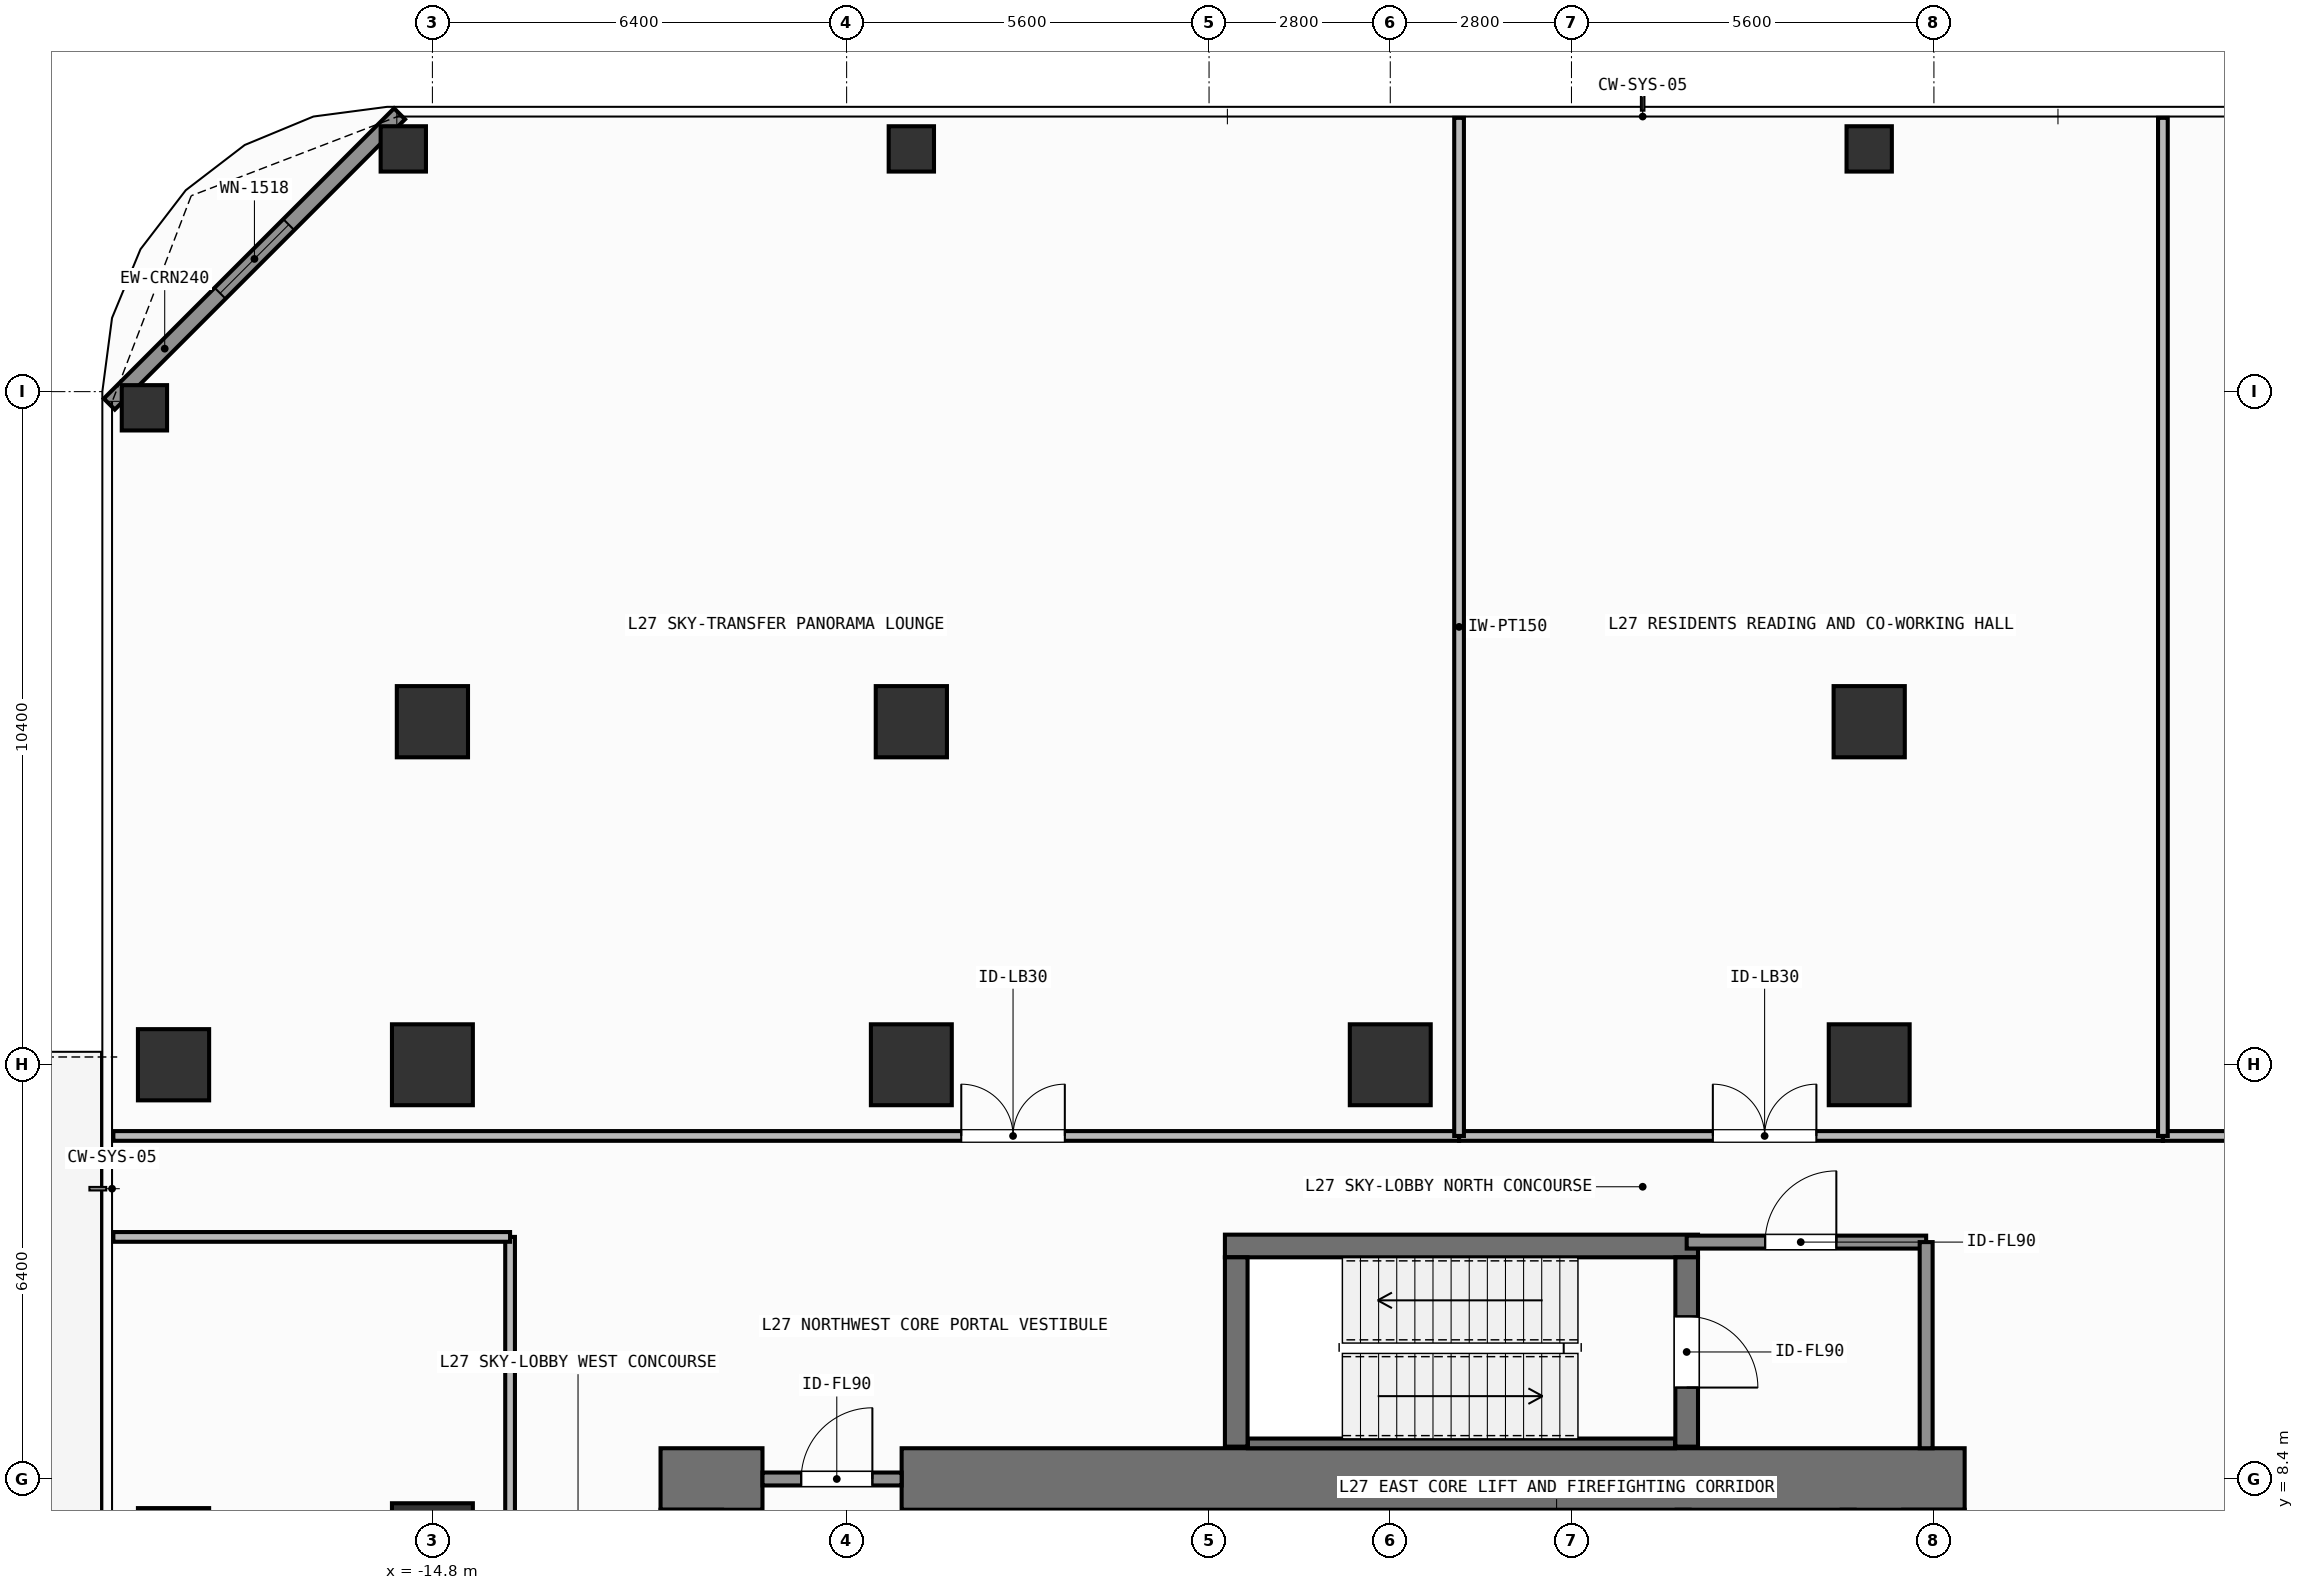
"""IFC4 building model, lengths in metres.
Left out: names, types, materials, properties, quantities, classifications, styles, units other than length and angle.
Written with IfcOpenShell. Run it as: python <this file> out.ifc"""

import sys

from ifc_helpers import new_model, si_unit, direction, frame, frame_2d, origin, origin_2d, place, context, subcontext, project, spatial, rectangle, hollow_rectangle, extrude, element, fill, save


model = new_model("IFC4")
c1 = context("Model", 3, precision=1e-05, world=origin(), true_north=direction((0.0, 1.0)))
c2 = subcontext(c1, "Body", "Model", "MODEL_VIEW")
j1 = project(units=[si_unit("LENGTHUNIT", "METRE"), si_unit("PLANEANGLEUNIT", "RADIAN")], contexts=[c1])
p1 = place(None, origin())
s1 = spatial("IfcSite", under=j1, at=p1, CompositionType="ELEMENT")
p2 = place(p1, origin())
s2 = spatial("IfcBuilding", under=s1, at=p2, CompositionType="ELEMENT")
p3 = place(p2, frame((0.0, 0.0, 108.6)))
s3 = spatial("IfcBuildingStorey", under=s2, at=p3, CompositionType="ELEMENT", Elevation=108.6)
p4 = place(p3, frame((-11.275, 8.4, 0.0), z_axis=(0.0, 0.0, 1.0), x_axis=(1.0, 0.0, 0.0)))
e1 = element("IfcWall", 1, at=p4, inside=s3, PredefinedType="SHEAR", context=c2, shape_type="SweptSolid", body=[
    extrude(rectangle(XDim=1.575, YDim=0.95, at=frame_2d((0.788, 0.0))), origin(), (0.0, 0.0, 1.0), 4.8),
])
p5 = place(p3, frame((-7.55, 8.4, 0.0), z_axis=(0.0, 0.0, 1.0), x_axis=(1.0, 0.0, 0.0)))
e2 = element("IfcWall", 2, at=p5, inside=s3, PredefinedType="SHEAR", context=c2, shape_type="SweptSolid", body=[
    extrude(rectangle(XDim=16.425, YDim=0.95, at=frame_2d((8.212, 0.0))), origin(), (0.0, 0.0, 1.0), 4.8),
])
p6 = place(p3, frame((-10.8, -7.925, 0.0), z_axis=(0.0, 0.0, 1.0), x_axis=(0.0, 1.0, 0.0)))
e3 = element("IfcWall", 3, at=p6, inside=s3, PredefinedType="SHEAR", context=c2, shape_type="SweptSolid", body=[
    extrude(rectangle(XDim=15.85, YDim=0.95, at=frame_2d((7.925, 0.0))), origin(), (0.0, 0.0, 1.0), 4.8),
])
p7 = place(p3, frame((8.4, 5.825, 0.0), z_axis=(0.0, 0.0, 1.0), x_axis=(0.0, 1.0, 0.0)))
e4 = element("IfcWall", 4, at=p7, inside=s3, PredefinedType="SHEAR", context=c2, shape_type="SweptSolid", body=[
    extrude(rectangle(XDim=2.1, YDim=0.95, at=frame_2d((1.05, 0.0))), origin(), (0.0, 0.0, 1.0), 4.8),
])
p8 = place(p3, frame((-2.555, 12.0, 0.0), z_axis=(0.0, 0.0, 1.0), x_axis=(1.0, 0.0, 0.0)))
e5 = element("IfcWall", 5, at=p8, inside=s3, PredefinedType="SHEAR", context=c2, shape_type="SweptSolid", body=[
    extrude(rectangle(XDim=7.31, YDim=0.35, at=frame_2d((3.655, 0.0))), origin(), (0.0, 0.0, 1.0), 4.8),
])
p9 = place(p3, frame((-2.2, 8.95, 0.0), z_axis=(0.0, 0.0, 1.0), x_axis=(1.0, 0.0, 0.0)))
e6 = element("IfcWall", 6, at=p9, inside=s3, PredefinedType="SHEAR", context=c2, shape_type="SweptSolid", body=[
    extrude(rectangle(XDim=6.6, YDim=0.15, at=frame_2d((3.3, 0.0))), origin(), (0.0, 0.0, 1.0), 4.8),
])
p10 = place(p3, frame((-2.38, 8.9, 0.0), z_axis=(0.0, 0.0, 1.0), x_axis=(0.0, 1.0, 0.0)))
e7 = element("IfcWall", 7, at=p10, inside=s3, PredefinedType="SHEAR", context=c2, shape_type="SweptSolid", body=[
    extrude(rectangle(XDim=2.925, YDim=0.35, at=frame_2d((1.462, 0.0))), origin(), (0.0, 0.0, 1.0), 4.8),
])
p11 = place(p3, frame((4.58, 11.825, 0.0), z_axis=(0.0, 0.0, 1.0), x_axis=(0.0, -1.0, 0.0)))
e8 = element("IfcWall", 8, at=p11, inside=s3, PredefinedType="SHEAR", context=c2, shape_type="SweptSolid", body=[
    extrude(rectangle(XDim=2.925, YDim=0.35, at=frame_2d((1.462, 0.0))), origin(), (0.0, 0.0, 1.0), 4.8),
])
p12 = place(p11, frame((0.913, 0.0, 0.0)))
e9 = element("IfcOpeningElement", 9, at=p12, cuts=e8, PredefinedType="OPENING", context=c2, shape_type="SweptSolid", body=[
    extrude(rectangle(XDim=1.1, YDim=2.15, at=frame_2d((0.55, 1.075))), frame((0.0, 0.185, 0.0), z_axis=(0.0, -1.0, 0.0), x_axis=(1.0, 0.0, 0.0)), (0.0, 0.0, 1.0), 0.37),
])
for number, where, z_axis, x_axis in (
    (10, (-14.8, 14.8, 0.0), (0.0, 0.0, 1.0), (1.0, 0.0, 0.0)),
    (11, (-7.4, 14.8, 0.0), (0.0, 0.0, 1.0), (1.0, 0.0, 0.0)),
    (12, (0.0, 14.8, 0.0), (0.0, 0.0, 1.0), (1.0, 0.0, 0.0)),
    (13, (7.4, 14.8, 0.0), (0.0, 0.0, 1.0), (1.0, 0.0, 0.0)),
    (14, (-14.8, 7.4, 0.0), (0.0, 0.0, 1.0), (1.0, 0.0, 0.0)),
):
    element("IfcColumn", number, at=place(p3, frame(where, z_axis=z_axis, x_axis=x_axis)), inside=s3, PredefinedType="COLUMN", context=c2, shape_type="SweptSolid", body=[
        extrude(rectangle(XDim=1.25, YDim=1.25, at=origin_2d()), origin(), (0.0, 0.0, 1.0), 4.8),
    ])
for number, where, z_axis, x_axis in (
    (15, (-18.8, 7.4, 0.0), (0.0, 0.0, 1.0), (1.0, 0.0, 0.0)),
    (16, (-18.8, 14.8, 0.0), (0.0, 0.0, 1.0), (1.0, 0.0, 0.0)),
    (17, (-14.8, 20.1, 0.0), (0.0, 0.0, 1.0), (1.0, 0.0, 0.0)),
    (18, (-7.4, 20.1, 0.0), (0.0, 0.0, 1.0), (1.0, 0.0, 0.0)),
    (19, (7.4, 20.1, 0.0), (0.0, 0.0, 1.0), (1.0, 0.0, 0.0)),
):
    element("IfcColumn", number, at=place(p3, frame(where, z_axis=z_axis, x_axis=x_axis)), inside=s3, PredefinedType="COLUMN", context=c2, shape_type="SweptSolid", body=[
        extrude(rectangle(XDim=1.1, YDim=1.1, at=origin_2d()), origin(), (0.0, 0.0, 1.0), 4.8),
    ])
for number, where, z_axis, x_axis in (
    (20, (-15.25, 28.95, 0.0), (0.0, 0.0, 1.0), (1.0, 0.0, 0.0)),
    (21, (-19.25, 24.95, 0.0), (0.0, 0.0, 1.0), (1.0, 0.0, 0.0)),
    (22, (-7.4, 28.95, 0.0), (0.0, 0.0, 1.0), (1.0, 0.0, 0.0)),
    (23, (7.4, 28.95, 0.0), (0.0, 0.0, 1.0), (1.0, 0.0, 0.0)),
):
    element("IfcColumn", number, at=place(p3, frame(where, z_axis=z_axis, x_axis=x_axis)), inside=s3, PredefinedType="COLUMN", context=c2, shape_type="SweptSolid", body=[
        extrude(hollow_rectangle(XDim=0.7, YDim=0.7, WallThickness=0.032, at=origin_2d()), origin(), (0.0, 0.0, 1.0), 4.8),
    ])
p13 = place(p3, frame((-19.792, 25.008, 0.0), z_axis=(0.0, 0.0, 1.0), x_axis=(0.707106781187, 0.707106781187, 0.0)))
e24 = element("IfcWall", 24, at=p13, inside=s3, PredefinedType="SOLIDWALL", context=c2, shape_type="SweptSolid", body=[
    extrude(rectangle(XDim=6.343, YDim=0.24, at=frame_2d((3.171, 0.0))), origin(), (0.0, 0.0, 1.0), 4.58),
])
p14 = place(p13, frame((2.421, 0.0, 0.8)))
e25 = element("IfcOpeningElement", 25, at=p14, cuts=e24, PredefinedType="OPENING", context=c2, shape_type="SweptSolid", body=[
    extrude(rectangle(XDim=1.5, YDim=1.85, at=frame_2d((0.75, 0.925))), frame((0.0, 0.13, 0.0), z_axis=(0.0, -1.0, 0.0), x_axis=(1.0, 0.0, 0.0)), (0.0, 0.0, 1.0), 0.26),
])
p15 = place(p3, frame((4.525, 5.825, 0.0), z_axis=(0.0, 0.0, 1.0), x_axis=(0.0, 1.0, 0.0)))
e26 = element("IfcWall", 26, at=p15, inside=s3, PredefinedType="SHEAR", context=c2, shape_type="SweptSolid", body=[
    extrude(rectangle(XDim=2.1, YDim=0.2, at=frame_2d((1.05, 0.0))), origin(), (0.0, 0.0, 1.0), 4.58),
])
p16 = place(p15, frame((0.425, 0.0, 0.0)))
e27 = element("IfcOpeningElement", 27, at=p16, cuts=e26, PredefinedType="OPENING", context=c2, shape_type="SweptSolid", body=[
    extrude(rectangle(XDim=1.1, YDim=2.2, at=frame_2d((0.55, 1.1))), frame((0.0, 0.11, 0.0), z_axis=(0.0, -1.0, 0.0), x_axis=(1.0, 0.0, 0.0)), (0.0, 0.0, 1.0), 0.22),
])
p17 = place(p3, frame((7.075, 5.825, 0.0), z_axis=(0.0, 0.0, 1.0), x_axis=(0.0, 1.0, 0.0)))
e28 = element("IfcWall", 28, at=p17, inside=s3, PredefinedType="SHEAR", context=c2, shape_type="SweptSolid", body=[
    extrude(rectangle(XDim=2.1, YDim=0.2, at=frame_2d((1.05, 0.0))), origin(), (0.0, 0.0, 1.0), 4.58),
])
p18 = place(p3, frame((4.58, 12.06, 0.0), z_axis=(0.0, 0.0, 1.0), x_axis=(1.0, 0.0, 0.0)))
e29 = element("IfcWall", 29, at=p18, inside=s3, PredefinedType="SOLIDWALL", context=c2, shape_type="SweptSolid", body=[
    extrude(rectangle(XDim=3.7, YDim=0.2, at=frame_2d((1.85, 0.0))), origin(), (0.0, 0.0, 1.0), 4.58),
])
p19 = place(p18, frame((1.212, 0.0, 0.0)))
e30 = element("IfcOpeningElement", 30, at=p19, cuts=e29, PredefinedType="OPENING", context=c2, shape_type="SweptSolid", body=[
    extrude(rectangle(XDim=1.1, YDim=2.15, at=frame_2d((0.55, 1.075))), frame((0.0, 0.11, 0.0), z_axis=(0.0, -1.0, 0.0), x_axis=(1.0, 0.0, 0.0)), (0.0, 0.0, 1.0), 0.22),
])
p20 = place(p3, frame((-9.7, 8.4, 0.0), z_axis=(0.0, 0.0, 1.0), x_axis=(1.0, 0.0, 0.0)))
e31 = element("IfcWall", 31, at=p20, inside=s3, PredefinedType="SOLIDWALL", context=c2, shape_type="SweptSolid", body=[
    extrude(rectangle(XDim=2.15, YDim=0.2, at=frame_2d((1.075, 0.0))), origin(), (0.0, 0.0, 1.0), 3.62),
])
p21 = place(p20, frame((0.598, 0.0, 0.0)))
e32 = element("IfcOpeningElement", 32, at=p21, cuts=e31, PredefinedType="OPENING", context=c2, shape_type="SweptSolid", body=[
    extrude(rectangle(XDim=1.1, YDim=2.15, at=frame_2d((0.55, 1.075))), frame((0.0, 0.11, 0.0), z_axis=(0.0, -1.0, 0.0), x_axis=(1.0, 0.0, 0.0)), (0.0, 0.0, 1.0), 0.22),
])
p22 = place(p3, frame((-19.73, 13.7, 0.0), z_axis=(0.0, 0.0, 1.0), x_axis=(1.0, 0.0, 0.0)))
e33 = element("IfcWall", 33, at=p22, inside=s3, PredefinedType="PARTITIONING", context=c2, shape_type="SweptSolid", body=[
    extrude(rectangle(XDim=20.793, YDim=0.15, at=frame_2d((10.396, 0.0))), origin(), (0.0, 0.0, 1.0), 4.58),
])
p23 = place(p22, frame((13.102, 0.0, 0.0)))
e34 = element("IfcOpeningElement", 34, at=p23, cuts=e33, PredefinedType="OPENING", context=c2, shape_type="SweptSolid", body=[
    extrude(rectangle(XDim=1.6, YDim=2.3, at=frame_2d((0.8, 1.15))), frame((0.0, 0.085, 0.0), z_axis=(0.0, -1.0, 0.0), x_axis=(1.0, 0.0, 0.0)), (0.0, 0.0, 1.0), 0.17),
])
p24 = place(p3, frame((1.063, 13.7, 0.0), z_axis=(0.0, 0.0, 1.0), x_axis=(1.0, 0.0, 0.0)))
e35 = element("IfcWall", 35, at=p24, inside=s3, PredefinedType="PARTITIONING", context=c2, shape_type="SweptSolid", body=[
    extrude(rectangle(XDim=10.875, YDim=0.15, at=frame_2d((5.438, 0.0))), origin(), (0.0, 0.0, 1.0), 4.58),
])
p25 = place(p24, frame((3.921, 0.0, 0.0)))
e36 = element("IfcOpeningElement", 36, at=p25, cuts=e35, PredefinedType="OPENING", context=c2, shape_type="SweptSolid", body=[
    extrude(rectangle(XDim=1.6, YDim=2.3, at=frame_2d((0.8, 1.15))), frame((0.0, 0.085, 0.0), z_axis=(0.0, -1.0, 0.0), x_axis=(1.0, 0.0, 0.0)), (0.0, 0.0, 1.0), 0.17),
])
p26 = place(p3, frame((11.938, 13.7, 0.0), z_axis=(0.0, 0.0, 1.0), x_axis=(1.0, 0.0, 0.0)))
e37 = element("IfcWall", 37, at=p26, inside=s3, PredefinedType="PARTITIONING", context=c2, shape_type="SweptSolid", body=[
    extrude(rectangle(XDim=15.592, YDim=0.15, at=frame_2d((7.796, 0.0))), origin(), (0.0, 0.0, 1.0), 4.58),
])
p27 = place(p26, frame((5.19, 0.0, 0.0)))
e38 = element("IfcOpeningElement", 38, at=p27, cuts=e37, PredefinedType="OPENING", context=c2, shape_type="SweptSolid", body=[
    extrude(rectangle(XDim=0.9, YDim=2.1, at=frame_2d((0.45, 1.05))), frame((0.0, 0.085, 0.0), z_axis=(0.0, -1.0, 0.0), x_axis=(1.0, 0.0, 0.0)), (0.0, 0.0, 1.0), 0.17),
])
p28 = place(p3, frame((-13.6, -12.14, 0.0), z_axis=(0.0, 0.0, 1.0), x_axis=(0.0, 1.0, 0.0)))
e39 = element("IfcWall", 39, at=p28, inside=s3, PredefinedType="PARTITIONING", context=c2, shape_type="SweptSolid", body=[
    extrude(rectangle(XDim=24.28, YDim=0.15, at=frame_2d((12.14, 0.0))), origin(), (0.0, 0.0, 1.0), 4.58),
])
p29 = place(p28, frame((11.25, 0.0, 0.0)))
e40 = element("IfcOpeningElement", 40, at=p29, cuts=e39, PredefinedType="OPENING", context=c2, shape_type="SweptSolid", body=[
    extrude(rectangle(XDim=1.6, YDim=2.3, at=frame_2d((0.8, 1.15))), frame((0.0, 0.085, 0.0), z_axis=(0.0, -1.0, 0.0), x_axis=(1.0, 0.0, 0.0)), (0.0, 0.0, 1.0), 0.17),
])
p30 = place(p3, frame((8.28, 8.875, 0.0), z_axis=(0.0, 0.0, 1.0), x_axis=(0.0, 1.0, 0.0)))
e41 = element("IfcWall", 41, at=p30, inside=s3, PredefinedType="SOLIDWALL", context=c2, shape_type="SweptSolid", body=[
    extrude(rectangle(XDim=3.185, YDim=0.2, at=frame_2d((1.593, 0.0))), origin(), (0.0, 0.0, 1.0), 4.58),
])
for number, where, z_axis, x_axis in (
    (42, (1.063, 13.7, 0.0), (0.0, 0.0, 1.0), (0.0, 1.0, 0.0)),
    (43, (11.938, 13.7, 0.0), (0.0, 0.0, 1.0), (0.0, 1.0, 0.0)),
):
    element("IfcWall", number, at=place(p3, frame(where, z_axis=z_axis, x_axis=x_axis)), inside=s3, PredefinedType="PARTITIONING", context=c2, shape_type="SweptSolid", body=[
        extrude(rectangle(XDim=15.73, YDim=0.15, at=frame_2d((7.865, 0.0))), origin(), (0.0, 0.0, 1.0), 4.58),
    ])
p31 = place(p3, frame((-19.73, 12.14, 0.0), z_axis=(0.0, 0.0, 1.0), x_axis=(1.0, 0.0, 0.0)))
e44 = element("IfcWall", 44, at=p31, inside=s3, PredefinedType="PARTITIONING", context=c2, shape_type="SweptSolid", body=[
    extrude(rectangle(XDim=6.13, YDim=0.15, at=frame_2d((3.065, 0.0))), origin(), (0.0, 0.0, 1.0), 4.58),
])
p32 = place(p14, origin())
e45 = element("IfcWindow", 45, at=p32, inside=s3, PartitioningType="SINGLE_PANEL", PredefinedType="WINDOW", context=c2, shape_type="SweptSolid", body=[
    extrude(rectangle(XDim=1.5, YDim=1.85, at=frame_2d((0.75, 0.925))), frame((0.0, 0.03, 0.0), z_axis=(0.0, -1.0, 0.0), x_axis=(1.0, 0.0, 0.0)), (0.0, 0.0, 1.0), 0.06),
])
fill(e25, e45)
p33 = place(p12, origin())
e46 = element("IfcDoor", 46, at=p33, inside=s3, OperationType="SINGLE_SWING_RIGHT", PredefinedType="DOOR", context=c2, shape_type="SweptSolid", body=[
    extrude(rectangle(XDim=1.1, YDim=2.15, at=frame_2d((0.55, 1.075))), frame((0.0, 0.025, 0.0), z_axis=(0.0, -1.0, 0.0), x_axis=(1.0, 0.0, 0.0)), (0.0, 0.0, 1.0), 0.05),
])
fill(e9, e46)
p34 = place(p19, origin())
e47 = element("IfcDoor", 47, at=p34, inside=s3, OperationType="SINGLE_SWING_RIGHT", PredefinedType="DOOR", context=c2, shape_type="SweptSolid", body=[
    extrude(rectangle(XDim=1.1, YDim=2.15, at=frame_2d((0.55, 1.075))), frame((0.0, 0.025, 0.0), z_axis=(0.0, -1.0, 0.0), x_axis=(1.0, 0.0, 0.0)), (0.0, 0.0, 1.0), 0.05),
])
fill(e30, e47)
p35 = place(p21, origin())
e48 = element("IfcDoor", 48, at=p35, inside=s3, OperationType="SINGLE_SWING_RIGHT", PredefinedType="DOOR", context=c2, shape_type="SweptSolid", body=[
    extrude(rectangle(XDim=1.1, YDim=2.15, at=frame_2d((0.55, 1.075))), frame((0.0, 0.025, 0.0), z_axis=(0.0, -1.0, 0.0), x_axis=(1.0, 0.0, 0.0)), (0.0, 0.0, 1.0), 0.05),
])
fill(e32, e48)
p36 = place(p23, origin())
e49 = element("IfcDoor", 49, at=p36, inside=s3, OperationType="SINGLE_SWING_LEFT", PredefinedType="DOOR", context=c2, shape_type="SweptSolid", body=[
    extrude(rectangle(XDim=1.6, YDim=2.3, at=frame_2d((0.8, 1.15))), frame((0.0, 0.025, 0.0), z_axis=(0.0, -1.0, 0.0), x_axis=(1.0, 0.0, 0.0)), (0.0, 0.0, 1.0), 0.05),
])
fill(e34, e49)
p37 = place(p25, origin())
e50 = element("IfcDoor", 50, at=p37, inside=s3, OperationType="SINGLE_SWING_LEFT", PredefinedType="DOOR", context=c2, shape_type="SweptSolid", body=[
    extrude(rectangle(XDim=1.6, YDim=2.3, at=frame_2d((0.8, 1.15))), frame((0.0, 0.025, 0.0), z_axis=(0.0, -1.0, 0.0), x_axis=(1.0, 0.0, 0.0)), (0.0, 0.0, 1.0), 0.05),
])
fill(e36, e50)
save(model, sys.argv[1])
